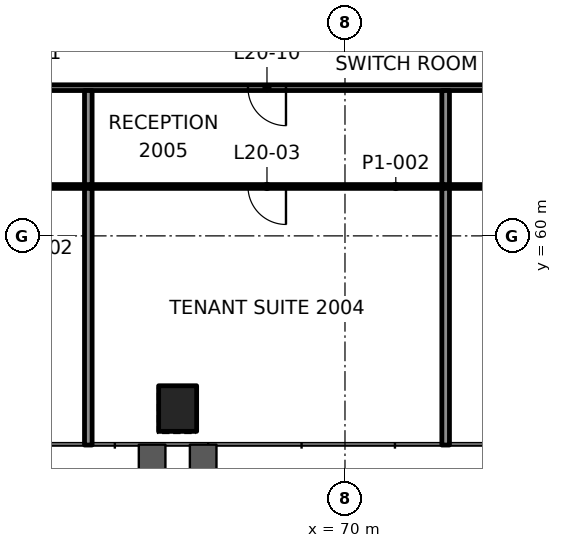
"""IFC4 building model, lengths in metres.
Left out: names, types, materials, properties, quantities, classifications, styles, units other than length and angle.
Written with IfcOpenShell. Run it as: python <this file> out.ifc"""

import sys

from ifc_helpers import new_model, si_unit, direction, frame, frame_2d, origin, origin_2d, place, context, subcontext, project, spatial, rectangle, extrude, element, fill, save


model = new_model("IFC4")
c1 = context("Model", 3, precision=1e-05, world=origin(), true_north=direction((0.0, 1.0)))
c2 = subcontext(c1, "Body", "Model", "MODEL_VIEW")
j1 = project(units=[si_unit("LENGTHUNIT", "METRE"), si_unit("PLANEANGLEUNIT", "RADIAN")], contexts=[c1])
p1 = place(None, origin())
s1 = spatial("IfcSite", under=j1, at=p1, CompositionType="ELEMENT")
p2 = place(p1, origin())
s2 = spatial("IfcBuilding", under=s1, at=p2, CompositionType="ELEMENT")
p3 = place(p2, frame((0.0, 0.0, 90.4)))
s3 = spatial("IfcBuildingStorey", under=s2, at=p3, CompositionType="ELEMENT", Elevation=90.4)
p4 = place(p3, frame((65.597, 55.456, -0.0), z_axis=(0.0, 0.0, 1.0), x_axis=(1.0, 0.0, 0.0)))
e1 = element("IfcColumn", 1, at=p4, inside=s3, PredefinedType="COLUMN", context=c2, shape_type="SweptSolid", body=[
    extrude(rectangle(XDim=1.0, YDim=1.2, at=origin_2d()), origin(), (0.0, 0.0, 1.0), 4.2),
])
p5 = place(p3, frame((84.403, 61.3, 0.0), z_axis=(0.0, 0.0, 1.0), x_axis=(-1.0, 0.0, 0.0)))
e2 = element("IfcWall", 2, at=p5, inside=s3, PredefinedType="PARTITIONING", context=c2, shape_type="SweptSolid", body=[
    extrude(rectangle(XDim=26.132, YDim=0.1, at=frame_2d((13.066, 0.0))), origin(), (0.0, 0.0, 1.0), 3.4),
])
p6 = place(p5, frame((2.59, 0.0, 0.0)))
e3 = element("IfcOpeningElement", 3, at=p6, cuts=e2, PredefinedType="OPENING", context=c2, shape_type="SweptSolid", body=[
    extrude(rectangle(XDim=0.9, YDim=2.1, at=frame_2d((0.45, 1.05))), frame((0.0, 0.06, 0.0), z_axis=(0.0, -1.0, 0.0), x_axis=(1.0, 0.0, 0.0)), (0.0, 0.0, 1.0), 0.12),
])
p7 = place(p5, frame((8.364, 0.0, 0.0)))
e4 = element("IfcOpeningElement", 4, at=p7, cuts=e2, PredefinedType="OPENING", context=c2, shape_type="SweptSolid", body=[
    extrude(rectangle(XDim=0.9, YDim=2.1, at=frame_2d((0.45, 1.05))), frame((0.0, 0.06, 0.0), z_axis=(0.0, -1.0, 0.0), x_axis=(1.0, 0.0, 0.0)), (0.0, 0.0, 1.0), 0.12),
])
p8 = place(p5, frame((15.956, 0.0, 0.0)))
e5 = element("IfcOpeningElement", 5, at=p8, cuts=e2, PredefinedType="OPENING", context=c2, shape_type="SweptSolid", body=[
    extrude(rectangle(XDim=1.0, YDim=2.1, at=frame_2d((0.5, 1.05))), frame((0.0, 0.06, 0.0), z_axis=(0.0, -1.0, 0.0), x_axis=(1.0, 0.0, 0.0)), (0.0, 0.0, 1.0), 0.12),
])
p9 = place(p5, frame((23.045, 0.0, 0.0)))
e6 = element("IfcOpeningElement", 6, at=p9, cuts=e2, PredefinedType="OPENING", context=c2, shape_type="SweptSolid", body=[
    extrude(rectangle(XDim=1.0, YDim=2.1, at=frame_2d((0.5, 1.05))), frame((0.0, 0.06, 0.0), z_axis=(0.0, -1.0, 0.0), x_axis=(1.0, 0.0, 0.0)), (0.0, 0.0, 1.0), 0.12),
])
p10 = place(p3, frame((90.1, 63.9, 0.0), z_axis=(0.0, 0.0, 1.0), x_axis=(-1.0, 0.0, 0.0)))
e7 = element("IfcWall", 7, at=p10, inside=s3, PredefinedType="PARTITIONING", context=c2, shape_type="SweptSolid", body=[
    extrude(rectangle(XDim=30.2, YDim=0.15, at=frame_2d((15.1, 0.0))), origin(), (0.0, 0.0, 1.0), 3.4),
])
p11 = place(p10, frame((2.35, 0.0, 0.0)))
e8 = element("IfcOpeningElement", 8, at=p11, cuts=e7, PredefinedType="OPENING", context=c2, shape_type="SweptSolid", body=[
    extrude(rectangle(XDim=1.2, YDim=2.1, at=frame_2d((0.6, 1.05))), frame((0.0, 0.085, 0.0), z_axis=(0.0, -1.0, 0.0), x_axis=(1.0, 0.0, 0.0)), (0.0, 0.0, 1.0), 0.17),
])
p12 = place(p10, frame((11.074, 0.0, 0.0)))
e9 = element("IfcOpeningElement", 9, at=p12, cuts=e7, PredefinedType="OPENING", context=c2, shape_type="SweptSolid", body=[
    extrude(rectangle(XDim=1.0, YDim=2.1, at=frame_2d((0.5, 1.05))), frame((0.0, 0.085, 0.0), z_axis=(0.0, -1.0, 0.0), x_axis=(1.0, 0.0, 0.0)), (0.0, 0.0, 1.0), 0.17),
])
p13 = place(p10, frame((21.653, 0.0, 0.0)))
e10 = element("IfcOpeningElement", 10, at=p13, cuts=e7, PredefinedType="OPENING", context=c2, shape_type="SweptSolid", body=[
    extrude(rectangle(XDim=1.0, YDim=2.1, at=frame_2d((0.5, 1.05))), frame((0.0, 0.085, 0.0), z_axis=(0.0, -1.0, 0.0), x_axis=(1.0, 0.0, 0.0)), (0.0, 0.0, 1.0), 0.17),
])
p14 = place(p10, frame((27.925, 0.0, 0.0)))
e11 = element("IfcOpeningElement", 11, at=p14, cuts=e7, PredefinedType="OPENING", context=c2, shape_type="SweptSolid", body=[
    extrude(rectangle(XDim=1.0, YDim=2.1, at=frame_2d((0.5, 1.05))), frame((0.0, 0.085, 0.0), z_axis=(0.0, -1.0, 0.0), x_axis=(1.0, 0.0, 0.0)), (0.0, 0.0, 1.0), 0.17),
])
for number, where, z_axis, x_axis in (
    (12, (72.649, 54.496, 0.0), (0.0, 0.0, 1.0), (0.0, 1.0, 0.0)),
    (13, (63.246, 54.496, 0.0), (0.0, 0.0, 1.0), (0.0, 1.0, 0.0)),
):
    element("IfcWall", number, at=place(p3, frame(where, z_axis=z_axis, x_axis=x_axis)), inside=s3, PredefinedType="PARTITIONING", context=c2, shape_type="SweptSolid", body=[
        extrude(rectangle(XDim=6.754, YDim=0.2, at=frame_2d((3.377, 0.0))), origin(), (0.0, 0.0, 1.0), 3.165),
    ])
for number, where, z_axis, x_axis in (
    (14, (72.649, 61.35, 0.0), (0.0, 0.0, 1.0), (0.0, 1.0, 0.0)),
    (15, (63.246, 61.35, 0.0), (0.0, 0.0, 1.0), (0.0, 1.0, 0.0)),
):
    element("IfcWall", number, at=place(p3, frame(where, z_axis=z_axis, x_axis=x_axis)), inside=s3, PredefinedType="PARTITIONING", context=c2, shape_type="SweptSolid", body=[
        extrude(rectangle(XDim=2.475, YDim=0.2, at=frame_2d((1.237, 0.0))), origin(), (0.0, 0.0, 1.0), 3.4),
    ])
p15 = place(p8, origin())
e16 = element("IfcDoor", 16, at=p15, inside=s3, OperationType="SINGLE_SWING_RIGHT", PredefinedType="DOOR", context=c2, shape_type="SweptSolid", body=[
    extrude(rectangle(XDim=1.0, YDim=2.1, at=frame_2d((0.5, 1.05))), frame((0.0, 0.025, 0.0), z_axis=(0.0, -1.0, 0.0), x_axis=(1.0, 0.0, 0.0)), (0.0, 0.0, 1.0), 0.05),
])
fill(e5, e16)
p16 = place(p13, origin())
e17 = element("IfcDoor", 17, at=p16, inside=s3, OperationType="SINGLE_SWING_LEFT", PredefinedType="DOOR", context=c2, shape_type="SweptSolid", body=[
    extrude(rectangle(XDim=1.0, YDim=2.1, at=frame_2d((0.5, 1.05))), frame((0.0, 0.025, 0.0), z_axis=(0.0, -1.0, 0.0), x_axis=(1.0, 0.0, 0.0)), (0.0, 0.0, 1.0), 0.05),
])
fill(e10, e17)
save(model, sys.argv[1])
